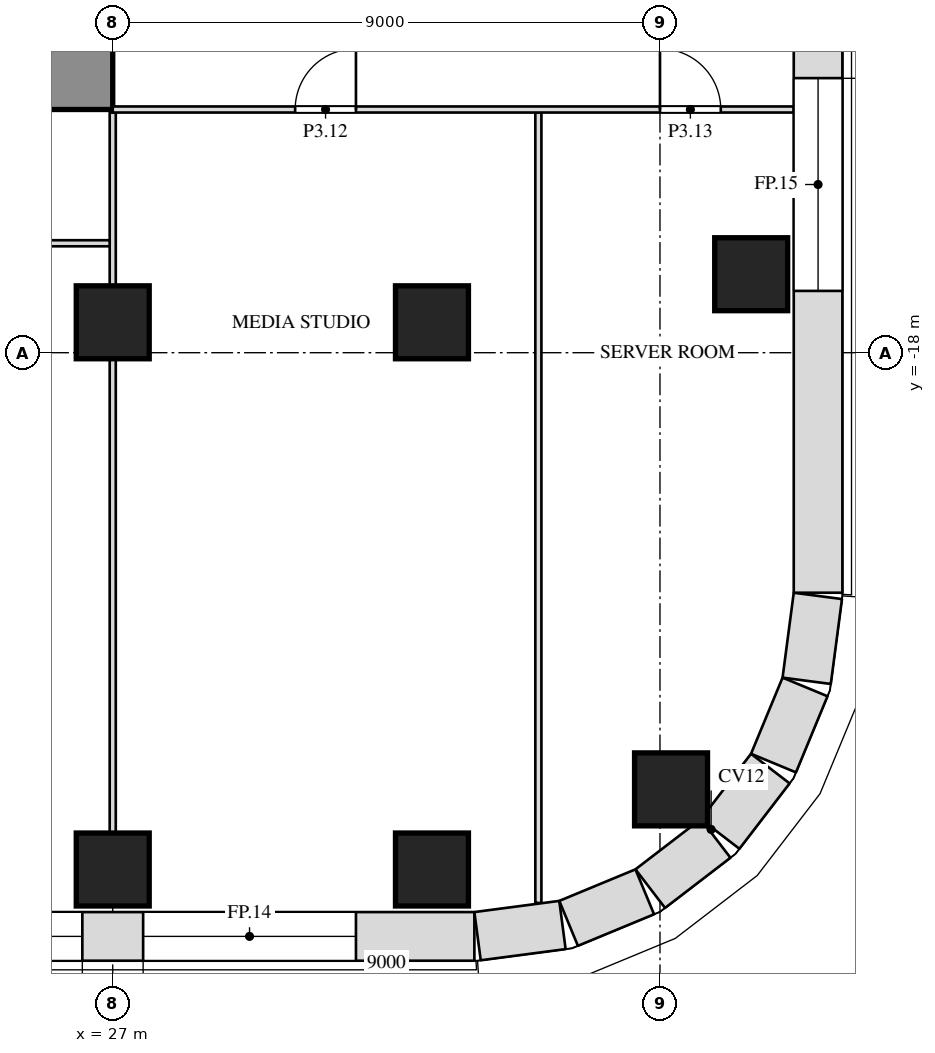
"""IFC4 building model, lengths in metres.
Left out: names, types, materials, properties, quantities, classifications, styles, units other than length and angle.
Written with IfcOpenShell. Run it as: python <this file> out.ifc"""

import sys

from ifc_helpers import new_model, si_unit, direction, frame, frame_2d, origin, origin_2d, place, context, subcontext, project, spatial, rectangle, extrude, element, fill, save


model = new_model("IFC4")
c1 = context("Model", 3, precision=1e-05, world=origin(), true_north=direction((0.0, 1.0)))
c2 = subcontext(c1, "Body", "Model", "MODEL_VIEW")
j1 = project(units=[si_unit("LENGTHUNIT", "METRE"), si_unit("PLANEANGLEUNIT", "RADIAN")], contexts=[c1])
p1 = place(None, origin())
s1 = spatial("IfcSite", under=j1, at=p1, CompositionType="ELEMENT")
p2 = place(p1, origin())
s2 = spatial("IfcBuilding", under=s1, at=p2, CompositionType="ELEMENT")
p3 = place(p2, frame((0.0, 0.0, 21.0)))
s3 = spatial("IfcBuildingStorey", under=s2, at=p3, CompositionType="ELEMENT", Elevation=21.0)
for number, where, z_axis, x_axis in (
    (1, (27.0, -26.5, 0.0), (0.0, 0.0, 1.0), (1.0, 0.0, 0.0)),
    (2, (32.25, -26.5, 0.0), (0.0, 0.0, 1.0), (1.0, 0.0, 0.0)),
    (3, (36.182, -25.182, 0.0), (0.0, 0.0, 1.0), (1.0, 0.0, 0.0)),
    (4, (27.0, -17.5, 0.0), (0.0, 0.0, 1.0), (1.0, 0.0, 0.0)),
    (5, (32.25, -17.5, 0.0), (0.0, 0.0, 1.0), (1.0, 0.0, 0.0)),
    (6, (37.5, -16.709, 0.0), (0.0, 0.0, 1.0), (1.0, 0.0, 0.0)),
):
    element("IfcColumn", number, at=place(p3, frame(where, z_axis=z_axis, x_axis=x_axis)), inside=s3, PredefinedType="COLUMN", context=c2, shape_type="SweptSolid", body=[
        extrude(rectangle(XDim=1.2, YDim=1.2, at=origin_2d()), origin(), (0.0, 0.0, 1.0), 6.0),
    ])
p4 = place(p3, frame((-27.0, -13.4, 0.0), z_axis=(0.0, 0.0, 1.0), x_axis=(1.0, 0.0, 0.0)))
e7 = element("IfcWall", 7, at=p4, inside=s3, PredefinedType="SHEAR", context=c2, shape_type="SweptSolid", body=[
    extrude(rectangle(XDim=54.0, YDim=1.2, at=frame_2d((27.0, 0.0))), origin(), (0.0, 0.0, 1.0), 5.7),
])
p5 = place(p4, frame((16.45, 0.0, 0.0)))
e8 = element("IfcOpeningElement", 8, at=p5, cuts=e7, PredefinedType="OPENING", context=c2, shape_type="SweptSolid", body=[
    extrude(rectangle(XDim=1.0, YDim=2.1, at=frame_2d((0.5, 1.05))), frame((0.0, 0.612, 0.0), z_axis=(0.0, -1.0, 0.0), x_axis=(1.0, 0.0, 0.0)), (0.0, 0.0, 1.0), 1.224),
])
p6 = place(p4, frame((36.55, 0.0, 0.0)))
e9 = element("IfcOpeningElement", 9, at=p6, cuts=e7, PredefinedType="OPENING", context=c2, shape_type="SweptSolid", body=[
    extrude(rectangle(XDim=1.0, YDim=2.1, at=frame_2d((0.5, 1.05))), frame((0.0, 0.612, 0.0), z_axis=(0.0, -1.0, 0.0), x_axis=(1.0, 0.0, 0.0)), (0.0, 0.0, 1.0), 1.224),
])
p7 = place(p3, frame((27.0, -25.9, 0.0), z_axis=(0.0, 0.0, 1.0), x_axis=(0.0, 1.0, 0.0)))
e10 = element("IfcWall", 10, at=p7, inside=s3, PredefinedType="PARTITIONING", context=c2, shape_type="SweptSolid", body=[
    extrude(rectangle(XDim=7.8, YDim=0.1, at=frame_2d((3.9, 0.0))), origin(), (0.0, 0.0, 1.0), 5.088),
])
p8 = place(p3, frame((27.0, -16.9, 0.0), z_axis=(0.0, 0.0, 1.0), x_axis=(0.0, 1.0, 0.0)))
e11 = element("IfcWall", 11, at=p8, inside=s3, PredefinedType="PARTITIONING", context=c2, shape_type="SweptSolid", body=[
    extrude(rectangle(XDim=2.85, YDim=0.1, at=frame_2d((1.425, 0.0))), origin(), (0.0, 0.0, 1.0), 5.088),
])
p9 = place(p3, frame((34.0, -27.05, 0.0), z_axis=(0.0, 0.0, 1.0), x_axis=(0.0, 1.0, 0.0)))
e12 = element("IfcWall", 12, at=p9, inside=s3, PredefinedType="PARTITIONING", context=c2, shape_type="SweptSolid", body=[
    extrude(rectangle(XDim=13.0, YDim=0.1, at=frame_2d((6.5, 0.0))), origin(), (0.0, 0.0, 1.0), 5.7),
])
p10 = place(p3, frame((17.925, -16.2, 0.0), z_axis=(0.0, 0.0, 1.0), x_axis=(1.0, 0.0, 0.0)))
e13 = element("IfcWall", 13, at=p10, inside=s3, PredefinedType="PARTITIONING", context=c2, shape_type="SweptSolid", body=[
    extrude(rectangle(XDim=9.025, YDim=0.1, at=frame_2d((4.512, 0.0))), origin(), (0.0, 0.0, 1.0), 5.7),
])
p11 = place(p10, frame((4.075, 0.0, 0.0)))
e14 = element("IfcOpeningElement", 14, at=p11, cuts=e13, PredefinedType="OPENING", context=c2, shape_type="SweptSolid", body=[
    extrude(rectangle(XDim=1.0, YDim=2.1, at=frame_2d((0.5, 1.05))), frame((0.0, 0.062, 0.0), z_axis=(0.0, -1.0, 0.0), x_axis=(1.0, 0.0, 0.0)), (0.0, 0.0, 1.0), 0.124),
])
p12 = place(p3, frame((27.0, -14.0, 0.0), z_axis=(0.0, 0.0, 1.0), x_axis=(1.0, 0.0, 0.0)))
e15 = element("IfcWall", 15, at=p12, inside=s3, PredefinedType="PARTITIONING", context=c2, shape_type="SweptSolid", body=[
    extrude(rectangle(XDim=11.2, YDim=0.1, at=frame_2d((5.6, 0.0))), origin(), (0.0, 0.0, 1.0), 5.7),
])
p13 = place(p12, frame((3.0, 0.0, 0.0)))
e16 = element("IfcOpeningElement", 16, at=p13, cuts=e15, PredefinedType="OPENING", context=c2, shape_type="SweptSolid", body=[
    extrude(rectangle(XDim=1.0, YDim=2.1, at=frame_2d((0.5, 1.05))), frame((0.0, 0.062, 0.0), z_axis=(0.0, -1.0, 0.0), x_axis=(1.0, 0.0, 0.0)), (0.0, 0.0, 1.0), 0.124),
])
p14 = place(p12, frame((9.0, 0.0, 0.0)))
e17 = element("IfcOpeningElement", 17, at=p14, cuts=e15, PredefinedType="OPENING", context=c2, shape_type="SweptSolid", body=[
    extrude(rectangle(XDim=1.0, YDim=2.1, at=frame_2d((0.5, 1.05))), frame((0.0, 0.062, 0.0), z_axis=(0.0, -1.0, 0.0), x_axis=(1.0, 0.0, 0.0)), (0.0, 0.0, 1.0), 0.124),
])
p15 = place(p3, frame((-32.948, -27.6, 0.0), z_axis=(0.0, 0.0, 1.0), x_axis=(1.0, 0.0, 0.0)))
e18 = element("IfcWall", 18, at=p15, inside=s3, PredefinedType="SOLIDWALL", context=c2, shape_type="SweptSolid", body=[
    extrude(rectangle(XDim=65.895, YDim=0.8, at=frame_2d((32.948, 0.0))), origin(), (0.0, 0.0, 1.0), 5.7),
])
p16 = place(p15, frame((1.948, 0.0, 1.0)))
e19 = element("IfcOpeningElement", 19, at=p16, cuts=e18, PredefinedType="OPENING", context=c2, shape_type="SweptSolid", body=[
    extrude(rectangle(XDim=3.5, YDim=4.0, at=frame_2d((1.75, 2.0))), frame((0.0, 0.412, 0.0), z_axis=(0.0, -1.0, 0.0), x_axis=(1.0, 0.0, 0.0)), (0.0, 0.0, 1.0), 0.824),
])
p17 = place(p15, frame((6.448, 0.0, 1.0)))
e20 = element("IfcOpeningElement", 20, at=p17, cuts=e18, PredefinedType="OPENING", context=c2, shape_type="SweptSolid", body=[
    extrude(rectangle(XDim=3.5, YDim=4.0, at=frame_2d((1.75, 2.0))), frame((0.0, 0.412, 0.0), z_axis=(0.0, -1.0, 0.0), x_axis=(1.0, 0.0, 0.0)), (0.0, 0.0, 1.0), 0.824),
])
p18 = place(p15, frame((10.948, 0.0, 1.0)))
e21 = element("IfcOpeningElement", 21, at=p18, cuts=e18, PredefinedType="OPENING", context=c2, shape_type="SweptSolid", body=[
    extrude(rectangle(XDim=3.5, YDim=4.0, at=frame_2d((1.75, 2.0))), frame((0.0, 0.412, 0.0), z_axis=(0.0, -1.0, 0.0), x_axis=(1.0, 0.0, 0.0)), (0.0, 0.0, 1.0), 0.824),
])
p19 = place(p15, frame((15.448, 0.0, 1.0)))
e22 = element("IfcOpeningElement", 22, at=p19, cuts=e18, PredefinedType="OPENING", context=c2, shape_type="SweptSolid", body=[
    extrude(rectangle(XDim=3.5, YDim=4.0, at=frame_2d((1.75, 2.0))), frame((0.0, 0.412, 0.0), z_axis=(0.0, -1.0, 0.0), x_axis=(1.0, 0.0, 0.0)), (0.0, 0.0, 1.0), 0.824),
])
p20 = place(p15, frame((19.948, 0.0, 1.0)))
e23 = element("IfcOpeningElement", 23, at=p20, cuts=e18, PredefinedType="OPENING", context=c2, shape_type="SweptSolid", body=[
    extrude(rectangle(XDim=3.5, YDim=4.0, at=frame_2d((1.75, 2.0))), frame((0.0, 0.412, 0.0), z_axis=(0.0, -1.0, 0.0), x_axis=(1.0, 0.0, 0.0)), (0.0, 0.0, 1.0), 0.824),
])
p21 = place(p15, frame((24.448, 0.0, 1.0)))
e24 = element("IfcOpeningElement", 24, at=p21, cuts=e18, PredefinedType="OPENING", context=c2, shape_type="SweptSolid", body=[
    extrude(rectangle(XDim=3.5, YDim=4.0, at=frame_2d((1.75, 2.0))), frame((0.0, 0.412, 0.0), z_axis=(0.0, -1.0, 0.0), x_axis=(1.0, 0.0, 0.0)), (0.0, 0.0, 1.0), 0.824),
])
p22 = place(p15, frame((28.948, 0.0, 1.0)))
e25 = element("IfcOpeningElement", 25, at=p22, cuts=e18, PredefinedType="OPENING", context=c2, shape_type="SweptSolid", body=[
    extrude(rectangle(XDim=3.5, YDim=4.0, at=frame_2d((1.75, 2.0))), frame((0.0, 0.412, 0.0), z_axis=(0.0, -1.0, 0.0), x_axis=(1.0, 0.0, 0.0)), (0.0, 0.0, 1.0), 0.824),
])
p23 = place(p15, frame((33.448, 0.0, 1.0)))
e26 = element("IfcOpeningElement", 26, at=p23, cuts=e18, PredefinedType="OPENING", context=c2, shape_type="SweptSolid", body=[
    extrude(rectangle(XDim=3.5, YDim=4.0, at=frame_2d((1.75, 2.0))), frame((0.0, 0.412, 0.0), z_axis=(0.0, -1.0, 0.0), x_axis=(1.0, 0.0, 0.0)), (0.0, 0.0, 1.0), 0.824),
])
p24 = place(p15, frame((37.948, 0.0, 1.0)))
e27 = element("IfcOpeningElement", 27, at=p24, cuts=e18, PredefinedType="OPENING", context=c2, shape_type="SweptSolid", body=[
    extrude(rectangle(XDim=3.5, YDim=4.0, at=frame_2d((1.75, 2.0))), frame((0.0, 0.412, 0.0), z_axis=(0.0, -1.0, 0.0), x_axis=(1.0, 0.0, 0.0)), (0.0, 0.0, 1.0), 0.824),
])
p25 = place(p15, frame((42.448, 0.0, 1.0)))
e28 = element("IfcOpeningElement", 28, at=p25, cuts=e18, PredefinedType="OPENING", context=c2, shape_type="SweptSolid", body=[
    extrude(rectangle(XDim=3.5, YDim=4.0, at=frame_2d((1.75, 2.0))), frame((0.0, 0.412, 0.0), z_axis=(0.0, -1.0, 0.0), x_axis=(1.0, 0.0, 0.0)), (0.0, 0.0, 1.0), 0.824),
])
p26 = place(p15, frame((46.948, 0.0, 1.0)))
e29 = element("IfcOpeningElement", 29, at=p26, cuts=e18, PredefinedType="OPENING", context=c2, shape_type="SweptSolid", body=[
    extrude(rectangle(XDim=3.5, YDim=4.0, at=frame_2d((1.75, 2.0))), frame((0.0, 0.412, 0.0), z_axis=(0.0, -1.0, 0.0), x_axis=(1.0, 0.0, 0.0)), (0.0, 0.0, 1.0), 0.824),
])
p27 = place(p15, frame((51.448, 0.0, 1.0)))
e30 = element("IfcOpeningElement", 30, at=p27, cuts=e18, PredefinedType="OPENING", context=c2, shape_type="SweptSolid", body=[
    extrude(rectangle(XDim=3.5, YDim=4.0, at=frame_2d((1.75, 2.0))), frame((0.0, 0.412, 0.0), z_axis=(0.0, -1.0, 0.0), x_axis=(1.0, 0.0, 0.0)), (0.0, 0.0, 1.0), 0.824),
])
p28 = place(p15, frame((55.948, 0.0, 1.0)))
e31 = element("IfcOpeningElement", 31, at=p28, cuts=e18, PredefinedType="OPENING", context=c2, shape_type="SweptSolid", body=[
    extrude(rectangle(XDim=3.5, YDim=4.0, at=frame_2d((1.75, 2.0))), frame((0.0, 0.412, 0.0), z_axis=(0.0, -1.0, 0.0), x_axis=(1.0, 0.0, 0.0)), (0.0, 0.0, 1.0), 0.824),
])
p29 = place(p15, frame((60.448, 0.0, 1.0)))
e32 = element("IfcOpeningElement", 32, at=p29, cuts=e18, PredefinedType="OPENING", context=c2, shape_type="SweptSolid", body=[
    extrude(rectangle(XDim=3.5, YDim=4.0, at=frame_2d((1.75, 2.0))), frame((0.0, 0.412, 0.0), z_axis=(0.0, -1.0, 0.0), x_axis=(1.0, 0.0, 0.0)), (0.0, 0.0, 1.0), 0.824),
])
p30 = place(p3, frame((33.0, -27.597, 0.0), z_axis=(0.0, 0.0, 1.0), x_axis=(0.99144603414, 0.130517283865, 0.0)))
e33 = element("IfcWall", 33, at=p30, inside=s3, PredefinedType="SOLIDWALL", context=c2, shape_type="SweptSolid", body=[
    extrude(rectangle(XDim=1.408, YDim=0.8, at=frame_2d((0.704, 0.0))), origin(), (0.0, 0.0, 1.0), 5.7),
])
p31 = place(p3, frame((34.497, -27.386, 0.0), z_axis=(0.0, 0.0, 1.0), x_axis=(0.923847774587, 0.38276009378, 0.0)))
e34 = element("IfcWall", 34, at=p31, inside=s3, PredefinedType="SOLIDWALL", context=c2, shape_type="SweptSolid", body=[
    extrude(rectangle(XDim=1.355, YDim=0.8, at=frame_2d((0.678, 0.0))), origin(), (0.0, 0.0, 1.0), 5.7),
])
for number, where, z_axis, x_axis in (
    (35, (35.84, -26.815, 0.0), (0.0, 0.0, 1.0), (0.793, 0.609, 0.0)),
    (36, (36.989, -25.916, 0.0), (0.0, 0.0, 1.0), (0.609, 0.793, 0.0)),
):
    element("IfcWall", number, at=place(p3, frame(where, z_axis=z_axis, x_axis=x_axis)), inside=s3, PredefinedType="SOLIDWALL", context=c2, shape_type="SweptSolid", body=[
        extrude(rectangle(XDim=1.356, YDim=0.8, at=frame_2d((0.678, 0.0))), origin(), (0.0, 0.0, 1.0), 5.7),
    ])
p32 = place(p3, frame((37.867, -24.75, 0.0), z_axis=(0.0, 0.0, 1.0), x_axis=(0.38276009378, 0.923847774587, 0.0)))
e37 = element("IfcWall", 37, at=p32, inside=s3, PredefinedType="SOLIDWALL", context=c2, shape_type="SweptSolid", body=[
    extrude(rectangle(XDim=1.355, YDim=0.8, at=frame_2d((0.678, 0.0))), origin(), (0.0, 0.0, 1.0), 5.7),
])
p33 = place(p3, frame((38.413, -23.396, 0.0), z_axis=(0.0, 0.0, 1.0), x_axis=(0.130517283865, 0.99144603414, 0.0)))
e38 = element("IfcWall", 38, at=p33, inside=s3, PredefinedType="SOLIDWALL", context=c2, shape_type="SweptSolid", body=[
    extrude(rectangle(XDim=1.408, YDim=0.8, at=frame_2d((0.704, 0.0))), origin(), (0.0, 0.0, 1.0), 5.7),
])
p34 = place(p3, frame((38.6, -21.948, 0.0), z_axis=(0.0, 0.0, 1.0), x_axis=(0.0, 1.0, 0.0)))
e39 = element("IfcWall", 39, at=p34, inside=s3, PredefinedType="SOLIDWALL", context=c2, shape_type="SweptSolid", body=[
    extrude(rectangle(XDim=35.895, YDim=0.8, at=frame_2d((17.948, 0.0))), origin(), (0.0, 0.0, 1.0), 5.7),
])
p35 = place(p34, frame((4.964, 0.0, 1.0)))
e40 = element("IfcOpeningElement", 40, at=p35, cuts=e39, PredefinedType="OPENING", context=c2, shape_type="SweptSolid", body=[
    extrude(rectangle(XDim=3.5, YDim=4.0, at=frame_2d((1.75, 2.0))), frame((0.0, 0.412, 0.0), z_axis=(0.0, -1.0, 0.0), x_axis=(1.0, 0.0, 0.0)), (0.0, 0.0, 1.0), 0.824),
])
p36 = place(p34, frame((9.458, 0.0, 1.0)))
e41 = element("IfcOpeningElement", 41, at=p36, cuts=e39, PredefinedType="OPENING", context=c2, shape_type="SweptSolid", body=[
    extrude(rectangle(XDim=3.5, YDim=4.0, at=frame_2d((1.75, 2.0))), frame((0.0, 0.412, 0.0), z_axis=(0.0, -1.0, 0.0), x_axis=(1.0, 0.0, 0.0)), (0.0, 0.0, 1.0), 0.824),
])
p37 = place(p34, frame((13.951, 0.0, 1.0)))
e42 = element("IfcOpeningElement", 42, at=p37, cuts=e39, PredefinedType="OPENING", context=c2, shape_type="SweptSolid", body=[
    extrude(rectangle(XDim=3.5, YDim=4.0, at=frame_2d((1.75, 2.0))), frame((0.0, 0.412, 0.0), z_axis=(0.0, -1.0, 0.0), x_axis=(1.0, 0.0, 0.0)), (0.0, 0.0, 1.0), 0.824),
])
p38 = place(p34, frame((18.444, 0.0, 1.0)))
e43 = element("IfcOpeningElement", 43, at=p38, cuts=e39, PredefinedType="OPENING", context=c2, shape_type="SweptSolid", body=[
    extrude(rectangle(XDim=3.5, YDim=4.0, at=frame_2d((1.75, 2.0))), frame((0.0, 0.412, 0.0), z_axis=(0.0, -1.0, 0.0), x_axis=(1.0, 0.0, 0.0)), (0.0, 0.0, 1.0), 0.824),
])
p39 = place(p34, frame((22.938, 0.0, 1.0)))
e44 = element("IfcOpeningElement", 44, at=p39, cuts=e39, PredefinedType="OPENING", context=c2, shape_type="SweptSolid", body=[
    extrude(rectangle(XDim=3.5, YDim=4.0, at=frame_2d((1.75, 2.0))), frame((0.0, 0.412, 0.0), z_axis=(0.0, -1.0, 0.0), x_axis=(1.0, 0.0, 0.0)), (0.0, 0.0, 1.0), 0.824),
])
p40 = place(p34, frame((27.431, 0.0, 1.0)))
e45 = element("IfcOpeningElement", 45, at=p40, cuts=e39, PredefinedType="OPENING", context=c2, shape_type="SweptSolid", body=[
    extrude(rectangle(XDim=3.5, YDim=4.0, at=frame_2d((1.75, 2.0))), frame((0.0, 0.412, 0.0), z_axis=(0.0, -1.0, 0.0), x_axis=(1.0, 0.0, 0.0)), (0.0, 0.0, 1.0), 0.824),
])
p41 = place(p13, origin())
e46 = element("IfcDoor", 46, at=p41, inside=s3, OperationType="SINGLE_SWING_RIGHT", PredefinedType="DOOR", context=c2, shape_type="SweptSolid", body=[
    extrude(rectangle(XDim=1.0, YDim=2.1, at=frame_2d((0.5, 1.05))), frame((0.0, 0.025, 0.0), z_axis=(0.0, -1.0, 0.0), x_axis=(1.0, 0.0, 0.0)), (0.0, 0.0, 1.0), 0.05),
])
fill(e16, e46)
p42 = place(p14, origin())
e47 = element("IfcDoor", 47, at=p42, inside=s3, OperationType="SINGLE_SWING_LEFT", PredefinedType="DOOR", context=c2, shape_type="SweptSolid", body=[
    extrude(rectangle(XDim=1.0, YDim=2.1, at=frame_2d((0.5, 1.05))), frame((0.0, 0.025, 0.0), z_axis=(0.0, -1.0, 0.0), x_axis=(1.0, 0.0, 0.0)), (0.0, 0.0, 1.0), 0.05),
])
fill(e17, e47)
p43 = place(p28, origin())
e48 = element("IfcWindow", 48, at=p43, inside=s3, PartitioningType="SINGLE_PANEL", PredefinedType="WINDOW", context=c2, shape_type="SweptSolid", body=[
    extrude(rectangle(XDim=3.5, YDim=4.0, at=frame_2d((1.75, 2.0))), frame((0.0, 0.03, 0.0), z_axis=(0.0, -1.0, 0.0), x_axis=(1.0, 0.0, 0.0)), (0.0, 0.0, 1.0), 0.06),
])
fill(e31, e48)
p44 = place(p29, origin())
e49 = element("IfcWindow", 49, at=p44, inside=s3, PartitioningType="SINGLE_PANEL", PredefinedType="WINDOW", context=c2, shape_type="SweptSolid", body=[
    extrude(rectangle(XDim=3.5, YDim=4.0, at=frame_2d((1.75, 2.0))), frame((0.0, 0.03, 0.0), z_axis=(0.0, -1.0, 0.0), x_axis=(1.0, 0.0, 0.0)), (0.0, 0.0, 1.0), 0.06),
])
fill(e32, e49)
p45 = place(p35, origin())
e50 = element("IfcWindow", 50, at=p45, inside=s3, PartitioningType="SINGLE_PANEL", PredefinedType="WINDOW", context=c2, shape_type="SweptSolid", body=[
    extrude(rectangle(XDim=3.5, YDim=4.0, at=frame_2d((1.75, 2.0))), frame((0.0, 0.03, 0.0), z_axis=(0.0, -1.0, 0.0), x_axis=(1.0, 0.0, 0.0)), (0.0, 0.0, 1.0), 0.06),
])
fill(e40, e50)
save(model, sys.argv[1])
